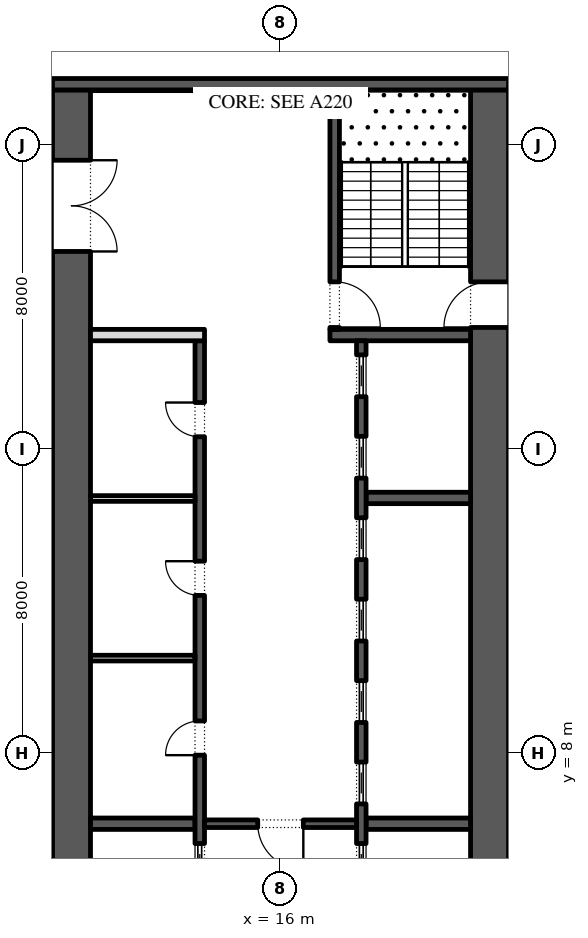
"""IFC4 building model, lengths in metres.
Left out: names, types, materials, properties, quantities, classifications, styles, units other than length and angle.
Written with IfcOpenShell. Run it as: python <this file> out.ifc"""

import sys

from ifc_helpers import new_model, si_unit, direction, frame, frame_2d, origin, place, context, subcontext, project, spatial, rectangle, extrude, element, fill, save


model = new_model("IFC4")
c1 = context("Model", 3, precision=1e-05, world=origin(), true_north=direction((0.0, 1.0)))
c2 = subcontext(c1, "Body", "Model", "MODEL_VIEW")
j1 = project(units=[si_unit("LENGTHUNIT", "METRE"), si_unit("PLANEANGLEUNIT", "RADIAN")], contexts=[c1])
p1 = place(None, origin())
s1 = spatial("IfcSite", under=j1, at=p1, CompositionType="ELEMENT")
p2 = place(p1, origin())
s2 = spatial("IfcBuilding", under=s1, at=p2, CompositionType="ELEMENT")
p3 = place(p2, frame((0.0, 0.0, 81.6)))
s3 = spatial("IfcBuildingStorey", under=s2, at=p3, CompositionType="ELEMENT", Elevation=81.6)
p4 = place(p3, frame((21.5, -2.45, 0.0), z_axis=(0.0, 0.0, 1.0), x_axis=(0.0, 1.0, 0.0)))
e1 = element("IfcWall", 1, at=p4, inside=s3, PredefinedType="SHEAR", context=c2, shape_type="SweptSolid", body=[
    extrude(rectangle(XDim=27.9, YDim=1.0, at=frame_2d((13.95, 0.0))), origin(), (0.0, 0.0, 1.0), 4.0),
])
p5 = place(p4, frame((5.05, 0.0, 0.0)))
e2 = element("IfcOpeningElement", 2, at=p5, cuts=e1, PredefinedType="OPENING", context=c2, shape_type="SweptSolid", body=[
    extrude(rectangle(XDim=1.2, YDim=2.1, at=frame_2d((0.6, 1.05))), frame((0.0, 0.51, 0.0), z_axis=(0.0, -1.0, 0.0), x_axis=(1.0, 0.0, 0.0)), (0.0, 0.0, 1.0), 1.02),
])
p6 = place(p4, frame((21.65, 0.0, 0.0)))
e3 = element("IfcOpeningElement", 3, at=p6, cuts=e1, PredefinedType="OPENING", context=c2, shape_type="SweptSolid", body=[
    extrude(rectangle(XDim=1.2, YDim=2.1, at=frame_2d((0.6, 1.05))), frame((0.0, 0.51, 0.0), z_axis=(0.0, -1.0, 0.0), x_axis=(1.0, 0.0, 0.0)), (0.0, 0.0, 1.0), 1.02),
])
p7 = place(p3, frame((10.5, -2.45, 0.0), z_axis=(0.0, 0.0, 1.0), x_axis=(0.0, 1.0, 0.0)))
e4 = element("IfcWall", 4, at=p7, inside=s3, PredefinedType="SHEAR", context=c2, shape_type="SweptSolid", body=[
    extrude(rectangle(XDim=27.9, YDim=1.0, at=frame_2d((13.95, 0.0))), origin(), (0.0, 0.0, 1.0), 4.0),
])
p8 = place(p7, frame((23.65, 0.0, 0.0)))
e5 = element("IfcOpeningElement", 5, at=p8, cuts=e4, PredefinedType="OPENING", context=c2, shape_type="SweptSolid", body=[
    extrude(rectangle(XDim=2.4, YDim=2.1, at=frame_2d((1.2, 1.05))), frame((0.0, 0.51, 0.0), z_axis=(0.0, -1.0, 0.0), x_axis=(1.0, 0.0, 0.0)), (0.0, 0.0, 1.0), 1.02),
])
p9 = place(p7, frame((0.788, 0.0, 0.0)))
e6 = element("IfcOpeningElement", 6, at=p9, cuts=e4, PredefinedType="OPENING", context=c2, shape_type="SweptSolid", body=[
    extrude(rectangle(XDim=0.9, YDim=2.1, at=frame_2d((0.45, 1.05))), frame((0.0, 0.51, 0.0), z_axis=(0.0, -1.0, 0.0), x_axis=(1.0, 0.0, 0.0)), (0.0, 0.0, 1.0), 1.02),
])
p10 = place(p7, frame((4.012, 0.0, 0.0)))
e7 = element("IfcOpeningElement", 7, at=p10, cuts=e4, PredefinedType="OPENING", context=c2, shape_type="SweptSolid", body=[
    extrude(rectangle(XDim=0.9, YDim=2.1, at=frame_2d((0.45, 1.05))), frame((0.0, 0.51, 0.0), z_axis=(0.0, -1.0, 0.0), x_axis=(1.0, 0.0, 0.0)), (0.0, 0.0, 1.0), 1.02),
])
p11 = place(p3, frame((10.0, 25.6, 0.0), z_axis=(0.0, 0.0, 1.0), x_axis=(1.0, 0.0, 0.0)))
e8 = element("IfcWall", 8, at=p11, inside=s3, PredefinedType="SHEAR", context=c2, shape_type="SweptSolid", body=[
    extrude(rectangle(XDim=12.0, YDim=0.3, at=frame_2d((6.0, 0.0))), origin(), (0.0, 0.0, 1.0), 4.0),
])
p12 = place(p3, frame((17.3, 19.0, 0.0), z_axis=(0.0, 0.0, 1.0), x_axis=(1.0, 0.0, 0.0)))
e9 = element("IfcWall", 9, at=p12, inside=s3, PredefinedType="SHEAR", context=c2, shape_type="SweptSolid", body=[
    extrude(rectangle(XDim=3.7, YDim=0.3, at=frame_2d((1.85, 0.0))), origin(), (0.0, 0.0, 1.0), 4.0),
])
p13 = place(p3, frame((17.425, 19.15, 0.0), z_axis=(0.0, 0.0, 1.0), x_axis=(0.0, 1.0, 0.0)))
e10 = element("IfcWall", 10, at=p13, inside=s3, PredefinedType="SHEAR", context=c2, shape_type="SweptSolid", body=[
    extrude(rectangle(XDim=6.3, YDim=0.25, at=frame_2d((3.15, 0.0))), origin(), (0.0, 0.0, 1.0), 4.0),
])
p14 = place(p13, frame((0.05, 0.0, 0.0)))
e11 = element("IfcOpeningElement", 11, at=p14, cuts=e10, PredefinedType="OPENING", context=c2, shape_type="SweptSolid", body=[
    extrude(rectangle(XDim=1.2, YDim=2.1, at=frame_2d((0.6, 1.05))), frame((0.0, 0.135, 0.0), z_axis=(0.0, -1.0, 0.0), x_axis=(1.0, 0.0, 0.0)), (0.0, 0.0, 1.0), 0.27),
])
for number, where, z_axis, x_axis in (
    (12, (18.25, 6.143, 0.0), (0.0, 0.0, 1.0), (1.0, 0.0, 0.0)),
    (13, (18.25, 14.714, 0.0), (0.0, 0.0, 1.0), (1.0, 0.0, 0.0)),
):
    element("IfcWall", number, at=place(p3, frame(where, z_axis=z_axis, x_axis=x_axis)), inside=s3, PredefinedType="SHEAR", context=c2, shape_type="SweptSolid", body=[
        extrude(rectangle(XDim=2.75, YDim=0.3, at=frame_2d((1.375, 0.0))), origin(), (0.0, 0.0, 1.0), 4.0),
    ])
p15 = place(p3, frame((18.125, 4.15, 0.0), z_axis=(0.0, 0.0, 1.0), x_axis=(0.0, 1.0, 0.0)))
e14 = element("IfcWall", 14, at=p15, inside=s3, PredefinedType="SHEAR", context=c2, shape_type="SweptSolid", body=[
    extrude(rectangle(XDim=14.7, YDim=0.25, at=frame_2d((7.35, 0.0))), origin(), (0.0, 0.0, 1.0), 4.0),
])
p16 = place(p15, frame((0.371, 0.0, 0.0)))
e15 = element("IfcOpeningElement", 15, at=p16, cuts=e14, PredefinedType="OPENING", context=c2, shape_type="SweptSolid", body=[
    extrude(rectangle(XDim=1.1, YDim=2.1, at=frame_2d((0.55, 1.05))), frame((0.0, 0.135, 0.0), z_axis=(0.0, -1.0, 0.0), x_axis=(1.0, 0.0, 0.0)), (0.0, 0.0, 1.0), 0.27),
])
p17 = place(p15, frame((2.514, 0.0, 0.0)))
e16 = element("IfcOpeningElement", 16, at=p17, cuts=e14, PredefinedType="OPENING", context=c2, shape_type="SweptSolid", body=[
    extrude(rectangle(XDim=1.1, YDim=2.1, at=frame_2d((0.55, 1.05))), frame((0.0, 0.135, 0.0), z_axis=(0.0, -1.0, 0.0), x_axis=(1.0, 0.0, 0.0)), (0.0, 0.0, 1.0), 0.27),
])
p18 = place(p15, frame((4.657, 0.0, 0.0)))
e17 = element("IfcOpeningElement", 17, at=p18, cuts=e14, PredefinedType="OPENING", context=c2, shape_type="SweptSolid", body=[
    extrude(rectangle(XDim=1.1, YDim=2.1, at=frame_2d((0.55, 1.05))), frame((0.0, 0.135, 0.0), z_axis=(0.0, -1.0, 0.0), x_axis=(1.0, 0.0, 0.0)), (0.0, 0.0, 1.0), 0.27),
])
p19 = place(p15, frame((6.8, 0.0, 0.0)))
e18 = element("IfcOpeningElement", 18, at=p19, cuts=e14, PredefinedType="OPENING", context=c2, shape_type="SweptSolid", body=[
    extrude(rectangle(XDim=1.1, YDim=2.1, at=frame_2d((0.55, 1.05))), frame((0.0, 0.135, 0.0), z_axis=(0.0, -1.0, 0.0), x_axis=(1.0, 0.0, 0.0)), (0.0, 0.0, 1.0), 0.27),
])
p20 = place(p15, frame((8.943, 0.0, 0.0)))
e19 = element("IfcOpeningElement", 19, at=p20, cuts=e14, PredefinedType="OPENING", context=c2, shape_type="SweptSolid", body=[
    extrude(rectangle(XDim=1.1, YDim=2.1, at=frame_2d((0.55, 1.05))), frame((0.0, 0.135, 0.0), z_axis=(0.0, -1.0, 0.0), x_axis=(1.0, 0.0, 0.0)), (0.0, 0.0, 1.0), 0.27),
])
p21 = place(p15, frame((11.086, 0.0, 0.0)))
e20 = element("IfcOpeningElement", 20, at=p21, cuts=e14, PredefinedType="OPENING", context=c2, shape_type="SweptSolid", body=[
    extrude(rectangle(XDim=1.1, YDim=2.1, at=frame_2d((0.55, 1.05))), frame((0.0, 0.135, 0.0), z_axis=(0.0, -1.0, 0.0), x_axis=(1.0, 0.0, 0.0)), (0.0, 0.0, 1.0), 0.27),
])
p22 = place(p15, frame((13.229, 0.0, 0.0)))
e21 = element("IfcOpeningElement", 21, at=p22, cuts=e14, PredefinedType="OPENING", context=c2, shape_type="SweptSolid", body=[
    extrude(rectangle(XDim=1.1, YDim=2.1, at=frame_2d((0.55, 1.05))), frame((0.0, 0.135, 0.0), z_axis=(0.0, -1.0, 0.0), x_axis=(1.0, 0.0, 0.0)), (0.0, 0.0, 1.0), 0.27),
])
p23 = place(p3, frame((11.0, 6.143, 0.0), z_axis=(0.0, 0.0, 1.0), x_axis=(1.0, 0.0, 0.0)))
e22 = element("IfcWall", 22, at=p23, inside=s3, PredefinedType="SHEAR", context=c2, shape_type="SweptSolid", body=[
    extrude(rectangle(XDim=2.75, YDim=0.3, at=frame_2d((1.375, 0.0))), origin(), (0.0, 0.0, 1.0), 4.0),
])
p24 = place(p3, frame((13.875, -2.45, 0.0), z_axis=(0.0, 0.0, 1.0), x_axis=(0.0, 1.0, 0.0)))
e23 = element("IfcWall", 23, at=p24, inside=s3, PredefinedType="SHEAR", context=c2, shape_type="SweptSolid", body=[
    extrude(rectangle(XDim=21.3, YDim=0.25, at=frame_2d((10.65, 0.0))), origin(), (0.0, 0.0, 1.0), 4.0),
])
p25 = place(p24, frame((10.396, 0.0, 0.0)))
e24 = element("IfcOpeningElement", 24, at=p25, cuts=e23, PredefinedType="OPENING", context=c2, shape_type="SweptSolid", body=[
    extrude(rectangle(XDim=0.9, YDim=2.1, at=frame_2d((0.45, 1.05))), frame((0.0, 0.135, 0.0), z_axis=(0.0, -1.0, 0.0), x_axis=(1.0, 0.0, 0.0)), (0.0, 0.0, 1.0), 0.27),
])
p26 = place(p24, frame((14.6, 0.0, 0.0)))
e25 = element("IfcOpeningElement", 25, at=p26, cuts=e23, PredefinedType="OPENING", context=c2, shape_type="SweptSolid", body=[
    extrude(rectangle(XDim=0.9, YDim=2.1, at=frame_2d((0.45, 1.05))), frame((0.0, 0.135, 0.0), z_axis=(0.0, -1.0, 0.0), x_axis=(1.0, 0.0, 0.0)), (0.0, 0.0, 1.0), 0.27),
])
p27 = place(p24, frame((18.775, 0.0, 0.0)))
e26 = element("IfcOpeningElement", 26, at=p27, cuts=e23, PredefinedType="OPENING", context=c2, shape_type="SweptSolid", body=[
    extrude(rectangle(XDim=0.9, YDim=2.1, at=frame_2d((0.45, 1.05))), frame((0.0, 0.135, 0.0), z_axis=(0.0, -1.0, 0.0), x_axis=(1.0, 0.0, 0.0)), (0.0, 0.0, 1.0), 0.27),
])
p28 = place(p24, frame((6.971, 0.0, 0.0)))
e27 = element("IfcOpeningElement", 27, at=p28, cuts=e23, PredefinedType="OPENING", context=c2, shape_type="SweptSolid", body=[
    extrude(rectangle(XDim=1.1, YDim=2.1, at=frame_2d((0.55, 1.05))), frame((0.0, 0.135, 0.0), z_axis=(0.0, -1.0, 0.0), x_axis=(1.0, 0.0, 0.0)), (0.0, 0.0, 1.0), 0.27),
])
p29 = place(p3, frame((11.0, 19.0, 0.0), z_axis=(0.0, 0.0, 1.0), x_axis=(1.0, 0.0, 0.0)))
e28 = element("IfcWall", 28, at=p29, inside=s3, PredefinedType="PARTITIONING", context=c2, shape_type="SweptSolid", body=[
    extrude(rectangle(XDim=3.0, YDim=0.3, at=frame_2d((1.5, 0.0))), origin(), (0.0, 0.0, 1.0), 4.0),
])
for number, where, z_axis, x_axis in (
    (29, (11.0, 10.5, 0.0), (0.0, 0.0, 1.0), (1.0, 0.0, 0.0)),
    (30, (11.0, 14.7, 0.0), (0.0, 0.0, 1.0), (1.0, 0.0, 0.0)),
):
    element("IfcWall", number, at=place(p3, frame(where, z_axis=z_axis, x_axis=x_axis)), inside=s3, PredefinedType="PARTITIONING", context=c2, shape_type="SweptSolid", body=[
        extrude(rectangle(XDim=2.75, YDim=0.15, at=frame_2d((1.375, 0.0))), origin(), (0.0, 0.0, 1.0), 4.0),
    ])
p30 = place(p3, frame((14.0, 6.143, 0.0), z_axis=(0.0, 0.0, 1.0), x_axis=(1.0, 0.0, 0.0)))
e31 = element("IfcWall", 31, at=p30, inside=s3, PredefinedType="SHEAR", context=c2, shape_type="SweptSolid", body=[
    extrude(rectangle(XDim=4.0, YDim=0.2, at=frame_2d((2.0, 0.0))), origin(), (0.0, 0.0, 1.0), 4.0),
])
p31 = place(p30, frame((1.4, 0.0, 0.0)))
e32 = element("IfcOpeningElement", 32, at=p31, cuts=e31, PredefinedType="OPENING", context=c2, shape_type="SweptSolid", body=[
    extrude(rectangle(XDim=1.2, YDim=2.1, at=frame_2d((0.6, 1.05))), frame((0.0, 0.11, 0.0), z_axis=(0.0, -1.0, 0.0), x_axis=(1.0, 0.0, 0.0)), (0.0, 0.0, 1.0), 0.22),
])
p32 = place(p16, origin())
e33 = element("IfcDoor", 33, at=p32, inside=s3, OperationType="SLIDING_TO_LEFT", PredefinedType="DOOR", context=c2, shape_type="SweptSolid", body=[
    extrude(rectangle(XDim=1.1, YDim=2.1, at=frame_2d((0.55, 1.05))), frame((0.0, 0.025, 0.0), z_axis=(0.0, -1.0, 0.0), x_axis=(1.0, 0.0, 0.0)), (0.0, 0.0, 1.0), 0.05),
])
fill(e15, e33)
p33 = place(p17, origin())
e34 = element("IfcDoor", 34, at=p33, inside=s3, OperationType="SLIDING_TO_LEFT", PredefinedType="DOOR", context=c2, shape_type="SweptSolid", body=[
    extrude(rectangle(XDim=1.1, YDim=2.1, at=frame_2d((0.55, 1.05))), frame((0.0, 0.025, 0.0), z_axis=(0.0, -1.0, 0.0), x_axis=(1.0, 0.0, 0.0)), (0.0, 0.0, 1.0), 0.05),
])
fill(e16, e34)
p34 = place(p18, origin())
e35 = element("IfcDoor", 35, at=p34, inside=s3, OperationType="SLIDING_TO_LEFT", PredefinedType="DOOR", context=c2, shape_type="SweptSolid", body=[
    extrude(rectangle(XDim=1.1, YDim=2.1, at=frame_2d((0.55, 1.05))), frame((0.0, 0.025, 0.0), z_axis=(0.0, -1.0, 0.0), x_axis=(1.0, 0.0, 0.0)), (0.0, 0.0, 1.0), 0.05),
])
fill(e17, e35)
p35 = place(p19, origin())
e36 = element("IfcDoor", 36, at=p35, inside=s3, OperationType="SLIDING_TO_LEFT", PredefinedType="DOOR", context=c2, shape_type="SweptSolid", body=[
    extrude(rectangle(XDim=1.1, YDim=2.1, at=frame_2d((0.55, 1.05))), frame((0.0, 0.025, 0.0), z_axis=(0.0, -1.0, 0.0), x_axis=(1.0, 0.0, 0.0)), (0.0, 0.0, 1.0), 0.05),
])
fill(e18, e36)
p36 = place(p20, origin())
e37 = element("IfcDoor", 37, at=p36, inside=s3, OperationType="SLIDING_TO_LEFT", PredefinedType="DOOR", context=c2, shape_type="SweptSolid", body=[
    extrude(rectangle(XDim=1.1, YDim=2.1, at=frame_2d((0.55, 1.05))), frame((0.0, 0.025, 0.0), z_axis=(0.0, -1.0, 0.0), x_axis=(1.0, 0.0, 0.0)), (0.0, 0.0, 1.0), 0.05),
])
fill(e19, e37)
p37 = place(p21, origin())
e38 = element("IfcDoor", 38, at=p37, inside=s3, OperationType="SLIDING_TO_LEFT", PredefinedType="DOOR", context=c2, shape_type="SweptSolid", body=[
    extrude(rectangle(XDim=1.1, YDim=2.1, at=frame_2d((0.55, 1.05))), frame((0.0, 0.025, 0.0), z_axis=(0.0, -1.0, 0.0), x_axis=(1.0, 0.0, 0.0)), (0.0, 0.0, 1.0), 0.05),
])
fill(e20, e38)
p38 = place(p22, origin())
e39 = element("IfcDoor", 39, at=p38, inside=s3, OperationType="SLIDING_TO_LEFT", PredefinedType="DOOR", context=c2, shape_type="SweptSolid", body=[
    extrude(rectangle(XDim=1.1, YDim=2.1, at=frame_2d((0.55, 1.05))), frame((0.0, 0.025, 0.0), z_axis=(0.0, -1.0, 0.0), x_axis=(1.0, 0.0, 0.0)), (0.0, 0.0, 1.0), 0.05),
])
fill(e21, e39)
p39 = place(p25, origin())
e40 = element("IfcDoor", 40, at=p39, inside=s3, OperationType="SINGLE_SWING_RIGHT", PredefinedType="DOOR", context=c2, shape_type="SweptSolid", body=[
    extrude(rectangle(XDim=0.9, YDim=2.1, at=frame_2d((0.45, 1.05))), frame((0.0, 0.125, 0.0), z_axis=(0.0, -1.0, 0.0), x_axis=(1.0, 0.0, 0.0)), (0.0, 0.0, 1.0), 0.05),
])
fill(e24, e40)
p40 = place(p26, origin())
e41 = element("IfcDoor", 41, at=p40, inside=s3, OperationType="SINGLE_SWING_LEFT", PredefinedType="DOOR", context=c2, shape_type="SweptSolid", body=[
    extrude(rectangle(XDim=0.9, YDim=2.1, at=frame_2d((0.45, 1.05))), frame((0.0, 0.125, 0.0), z_axis=(0.0, -1.0, 0.0), x_axis=(1.0, 0.0, 0.0)), (0.0, 0.0, 1.0), 0.05),
])
fill(e25, e41)
p41 = place(p27, origin())
e42 = element("IfcDoor", 42, at=p41, inside=s3, OperationType="SINGLE_SWING_LEFT", PredefinedType="DOOR", context=c2, shape_type="SweptSolid", body=[
    extrude(rectangle(XDim=0.9, YDim=2.1, at=frame_2d((0.45, 1.05))), frame((0.0, 0.125, 0.0), z_axis=(0.0, -1.0, 0.0), x_axis=(1.0, 0.0, 0.0)), (0.0, 0.0, 1.0), 0.05),
])
fill(e26, e42)
p42 = place(p28, origin())
e43 = element("IfcDoor", 43, at=p42, inside=s3, OperationType="SLIDING_TO_LEFT", PredefinedType="DOOR", context=c2, shape_type="SweptSolid", body=[
    extrude(rectangle(XDim=1.1, YDim=2.1, at=frame_2d((0.55, 1.05))), frame((0.0, 0.025, 0.0), z_axis=(0.0, -1.0, 0.0), x_axis=(1.0, 0.0, 0.0)), (0.0, 0.0, 1.0), 0.05),
])
fill(e27, e43)
p43 = place(p31, frame((1.2, 0.0, 0.0), z_axis=(0.0, 0.0, 1.0), x_axis=(-1.0, 0.0, 0.0)))
e44 = element("IfcDoor", 44, at=p43, inside=s3, OperationType="SINGLE_SWING_RIGHT", PredefinedType="DOOR", context=c2, shape_type="SweptSolid", body=[
    extrude(rectangle(XDim=1.2, YDim=2.1, at=frame_2d((0.6, 1.05))), frame((0.0, 0.025, 0.0), z_axis=(0.0, -1.0, 0.0), x_axis=(1.0, 0.0, 0.0)), (0.0, 0.0, 1.0), 0.05),
])
fill(e32, e44)
p44 = place(p8, frame((2.4, 0.0, 0.0), z_axis=(0.0, 0.0, 1.0), x_axis=(-1.0, 0.0, 0.0)))
e45 = element("IfcDoor", 45, at=p44, inside=s3, OperationType="DOUBLE_DOOR_SINGLE_SWING", PredefinedType="DOOR", context=c2, shape_type="SweptSolid", body=[
    extrude(rectangle(XDim=2.4, YDim=2.1, at=frame_2d((1.2, 1.05))), frame((0.0, 0.025, 0.0), z_axis=(0.0, -1.0, 0.0), x_axis=(1.0, 0.0, 0.0)), (0.0, 0.0, 1.0), 0.05),
])
fill(e5, e45)
p45 = place(p14, frame((1.2, 0.0, 0.0), z_axis=(0.0, 0.0, 1.0), x_axis=(-1.0, 0.0, 0.0)))
e46 = element("IfcDoor", 46, at=p45, inside=s3, OperationType="SINGLE_SWING_LEFT", PredefinedType="DOOR", context=c2, shape_type="SweptSolid", body=[
    extrude(rectangle(XDim=1.2, YDim=2.1, at=frame_2d((0.6, 1.05))), frame((0.0, 0.025, 0.0), z_axis=(0.0, -1.0, 0.0), x_axis=(1.0, 0.0, 0.0)), (0.0, 0.0, 1.0), 0.05),
])
fill(e11, e46)
p46 = place(p6, origin())
e47 = element("IfcDoor", 47, at=p46, inside=s3, OperationType="SINGLE_SWING_RIGHT", PredefinedType="DOOR", context=c2, shape_type="SweptSolid", body=[
    extrude(rectangle(XDim=1.2, YDim=2.1, at=frame_2d((0.6, 1.05))), frame((0.0, 0.025, 0.0), z_axis=(0.0, -1.0, 0.0), x_axis=(1.0, 0.0, 0.0)), (0.0, 0.0, 1.0), 0.05),
])
fill(e3, e47)
save(model, sys.argv[1])
